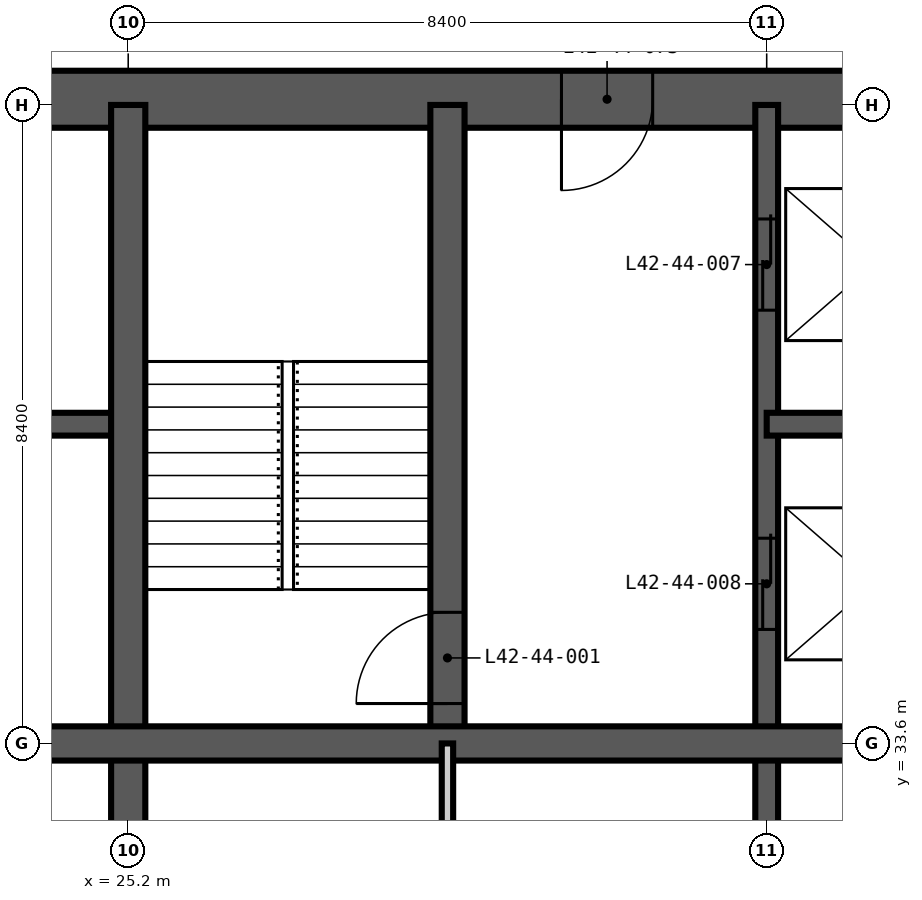
"""IFC4 building model, lengths in metres.
Left out: names, types, materials, properties, quantities, classifications, styles, units other than length and angle.
Written with IfcOpenShell. Run it as: python <this file> out.ifc"""

import sys

from ifc_helpers import new_model, si_unit, direction, frame, frame_2d, origin, place, context, subcontext, project, spatial, rectangle, extrude, element, fill, save


model = new_model("IFC4")
c1 = context("Model", 3, precision=1e-05, world=origin(), true_north=direction((0.0, 1.0)))
c2 = subcontext(c1, "Body", "Model", "MODEL_VIEW")
j1 = project(units=[si_unit("LENGTHUNIT", "METRE"), si_unit("PLANEANGLEUNIT", "RADIAN")], contexts=[c1])
p1 = place(None, origin())
s1 = spatial("IfcSite", under=j1, at=p1, CompositionType="ELEMENT")
p2 = place(p1, origin())
s2 = spatial("IfcBuilding", under=s1, at=p2, CompositionType="ELEMENT")
p3 = place(p2, frame((0.0, 0.0, 166.2)))
s3 = spatial("IfcBuildingStorey", under=s2, at=p3, CompositionType="ELEMENT", Elevation=166.2)
p4 = place(p3, frame((42.45, 42.075, -0.35), z_axis=(0.0, 0.0, 1.0), x_axis=(-1.0, 0.0, 0.0)))
e1 = element("IfcWall", 1, at=p4, inside=s3, PredefinedType="SHEAR", context=c2, shape_type="SweptSolid", body=[
    extrude(rectangle(XDim=26.1, YDim=0.75, at=frame_2d((13.05, 0.0))), origin(), (0.0, 0.0, 1.0), 3.6),
])
p5 = place(p4, frame((20.95, 0.0, 0.35)))
e2 = element("IfcOpeningElement", 2, at=p5, cuts=e1, PredefinedType="OPENING", context=c2, shape_type="SweptSolid", body=[
    extrude(rectangle(XDim=1.0, YDim=2.1, at=frame_2d((0.5, 1.05))), frame((0.0, 0.385, 0.0), z_axis=(0.0, -1.0, 0.0), x_axis=(1.0, 0.0, 0.0)), (0.0, 0.0, 1.0), 0.77),
])
p6 = place(p4, frame((10.35, 0.0, 0.35)))
e3 = element("IfcOpeningElement", 3, at=p6, cuts=e1, PredefinedType="OPENING", context=c2, shape_type="SweptSolid", body=[
    extrude(rectangle(XDim=1.2, YDim=2.2, at=frame_2d((0.6, 1.1))), frame((0.0, 0.385, 0.0), z_axis=(0.0, -1.0, 0.0), x_axis=(1.0, 0.0, 0.0)), (0.0, 0.0, 1.0), 0.77),
])
p7 = place(p3, frame((33.6, 16.8, -0.35), z_axis=(0.0, 0.0, 1.0), x_axis=(0.0, 1.0, 0.0)))
e4 = element("IfcWall", 4, at=p7, inside=s3, PredefinedType="SHEAR", context=c2, shape_type="SweptSolid", body=[
    extrude(rectangle(XDim=25.2, YDim=0.3, at=frame_2d((12.6, 0.0))), origin(), (0.0, 0.0, 1.0), 3.6),
])
p8 = place(p7, frame((22.5, 0.0, 0.35)))
e5 = element("IfcOpeningElement", 5, at=p8, cuts=e4, PredefinedType="OPENING", context=c2, shape_type="SweptSolid", body=[
    extrude(rectangle(XDim=1.2, YDim=2.2, at=frame_2d((0.6, 1.1))), frame((0.0, 0.16, 0.0), z_axis=(0.0, -1.0, 0.0), x_axis=(1.0, 0.0, 0.0)), (0.0, 0.0, 1.0), 0.32),
])
p9 = place(p7, frame((18.3, 0.0, 0.35)))
e6 = element("IfcOpeningElement", 6, at=p9, cuts=e4, PredefinedType="OPENING", context=c2, shape_type="SweptSolid", body=[
    extrude(rectangle(XDim=1.2, YDim=2.2, at=frame_2d((0.6, 1.1))), frame((0.0, 0.16, 0.0), z_axis=(0.0, -1.0, 0.0), x_axis=(1.0, 0.0, 0.0)), (0.0, 0.0, 1.0), 0.32),
])
p10 = place(p7, frame((12.1, 0.0, 0.35)))
e7 = element("IfcOpeningElement", 7, at=p10, cuts=e4, PredefinedType="OPENING", context=c2, shape_type="SweptSolid", body=[
    extrude(rectangle(XDim=1.0, YDim=2.1, at=frame_2d((0.5, 1.05))), frame((0.0, 0.16, 0.0), z_axis=(0.0, -1.0, 0.0), x_axis=(1.0, 0.0, 0.0)), (0.0, 0.0, 1.0), 0.32),
])
p11 = place(p3, frame((16.8, 37.8, -0.35), z_axis=(0.0, 0.0, 1.0), x_axis=(1.0, 0.0, 0.0)))
e8 = element("IfcWall", 8, at=p11, inside=s3, PredefinedType="SHEAR", context=c2, shape_type="SweptSolid", body=[
    extrude(rectangle(XDim=8.4, YDim=0.3, at=frame_2d((4.2, 0.0))), origin(), (0.0, 0.0, 1.0), 3.6),
])
p12 = place(p3, frame((33.6, 37.8, -0.35), z_axis=(0.0, 0.0, 1.0), x_axis=(1.0, 0.0, 0.0)))
e9 = element("IfcWall", 9, at=p12, inside=s3, PredefinedType="SHEAR", context=c2, shape_type="SweptSolid", body=[
    extrude(rectangle(XDim=2.8, YDim=0.3, at=frame_2d((1.4, 0.0))), origin(), (0.0, 0.0, 1.0), 3.6),
])
p13 = place(p3, frame((25.2, 16.8, -0.35), z_axis=(0.0, 0.0, 1.0), x_axis=(0.0, 1.0, 0.0)))
e10 = element("IfcWall", 10, at=p13, inside=s3, PredefinedType="SHEAR", context=c2, shape_type="SweptSolid", body=[
    extrude(rectangle(XDim=25.2, YDim=0.45, at=frame_2d((12.6, 0.0))), origin(), (0.0, 0.0, 1.0), 3.6),
])
p14 = place(p3, frame((29.4, 33.6, -0.35), z_axis=(0.0, 0.0, 1.0), x_axis=(0.0, 1.0, 0.0)))
e11 = element("IfcWall", 11, at=p14, inside=s3, PredefinedType="SHEAR", context=c2, shape_type="SweptSolid", body=[
    extrude(rectangle(XDim=8.4, YDim=0.45, at=frame_2d((4.2, 0.0))), origin(), (0.0, 0.0, 1.0), 3.6),
])
p15 = place(p14, frame((0.525, 0.0, 0.35)))
e12 = element("IfcOpeningElement", 12, at=p15, cuts=e11, PredefinedType="OPENING", context=c2, shape_type="SweptSolid", body=[
    extrude(rectangle(XDim=1.2, YDim=2.2, at=frame_2d((0.6, 1.1))), frame((0.0, 0.235, 0.0), z_axis=(0.0, -1.0, 0.0), x_axis=(1.0, 0.0, 0.0)), (0.0, 0.0, 1.0), 0.47),
])
p16 = place(p3, frame((16.8, 33.6, -0.35), z_axis=(0.0, 0.0, 1.0), x_axis=(1.0, 0.0, 0.0)))
e13 = element("IfcWall", 13, at=p16, inside=s3, PredefinedType="SHEAR", context=c2, shape_type="SweptSolid", body=[
    extrude(rectangle(XDim=25.2, YDim=0.45, at=frame_2d((12.6, 0.0))), origin(), (0.0, 0.0, 1.0), 3.6),
])
p17 = place(p3, frame((29.4, 30.8, 0.0), z_axis=(0.0, 0.0, 1.0), x_axis=(0.0, 1.0, 0.0)))
e14 = element("IfcWall", 14, at=p17, inside=s3, PredefinedType="PARTITIONING", context=c2, shape_type="SweptSolid", body=[
    extrude(rectangle(XDim=2.8, YDim=0.15, at=frame_2d((1.4, 0.0))), origin(), (0.0, 0.0, 1.0), 3.25),
])
p18 = place(p15, origin())
e15 = element("IfcDoor", 15, at=p18, inside=s3, OperationType="SINGLE_SWING_LEFT", PredefinedType="DOOR", context=c2, shape_type="SweptSolid", body=[
    extrude(rectangle(XDim=1.2, YDim=2.2, at=frame_2d((0.6, 1.1))), frame((0.0, 0.025, 0.0), z_axis=(0.0, -1.0, 0.0), x_axis=(1.0, 0.0, 0.0)), (0.0, 0.0, 1.0), 0.05),
])
fill(e12, e15)
p19 = place(p8, origin())
e16 = element("IfcDoor", 16, at=p19, inside=s3, OperationType="DOUBLE_DOOR_SLIDING", PredefinedType="DOOR", context=c2, shape_type="SweptSolid", body=[
    extrude(rectangle(XDim=1.2, YDim=2.2, at=frame_2d((0.6, 1.1))), frame((0.0, 0.025, 0.0), z_axis=(0.0, -1.0, 0.0), x_axis=(1.0, 0.0, 0.0)), (0.0, 0.0, 1.0), 0.05),
])
fill(e5, e16)
p20 = place(p9, origin())
e17 = element("IfcDoor", 17, at=p20, inside=s3, OperationType="DOUBLE_DOOR_SLIDING", PredefinedType="DOOR", context=c2, shape_type="SweptSolid", body=[
    extrude(rectangle(XDim=1.2, YDim=2.2, at=frame_2d((0.6, 1.1))), frame((0.0, 0.025, 0.0), z_axis=(0.0, -1.0, 0.0), x_axis=(1.0, 0.0, 0.0)), (0.0, 0.0, 1.0), 0.05),
])
fill(e6, e17)
p21 = place(p6, origin())
e18 = element("IfcDoor", 18, at=p21, inside=s3, OperationType="SINGLE_SWING_RIGHT", PredefinedType="DOOR", context=c2, shape_type="SweptSolid", body=[
    extrude(rectangle(XDim=1.2, YDim=2.2, at=frame_2d((0.6, 1.1))), frame((0.0, 0.025, 0.0), z_axis=(0.0, -1.0, 0.0), x_axis=(1.0, 0.0, 0.0)), (0.0, 0.0, 1.0), 0.05),
])
fill(e3, e18)
save(model, sys.argv[1])
